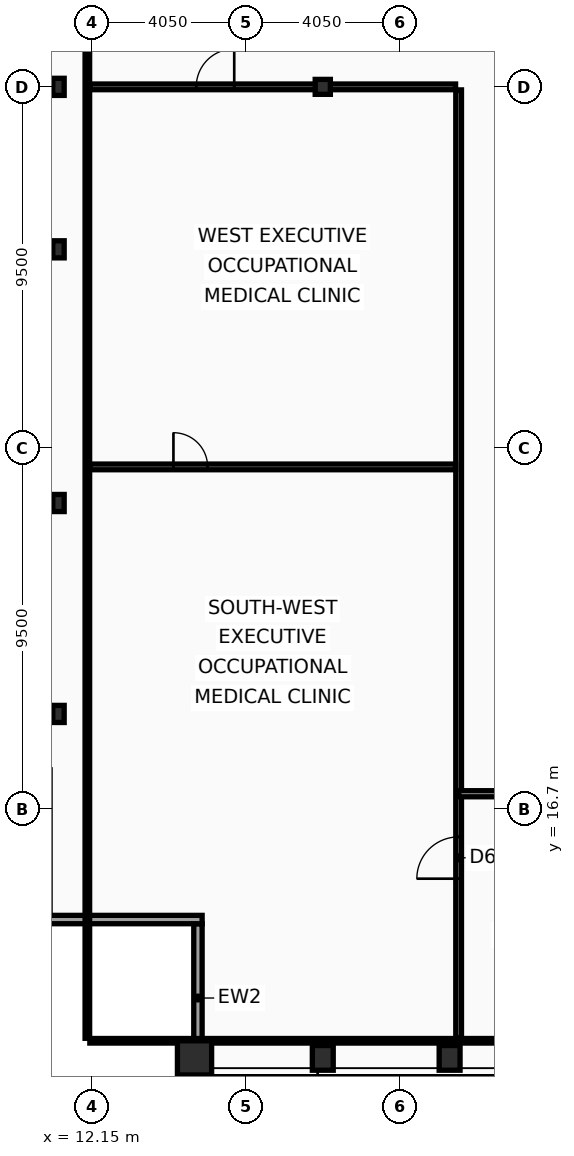
"""IFC4 building model, lengths in metres.
Left out: names, types, materials, properties, quantities, classifications, styles, units other than length and angle.
Written with IfcOpenShell. Run it as: python <this file> out.ifc"""

import sys

from ifc_helpers import new_model, si_unit, direction, frame, frame_2d, origin, origin_2d, place, context, subcontext, project, spatial, rectangle, hollow_rectangle, i_section, extrude, element, fill, save


model = new_model("IFC4")
c1 = context("Model", 3, precision=1e-05, world=origin(), true_north=direction((0.0, 1.0)))
c2 = subcontext(c1, "Body", "Model", "MODEL_VIEW")
j1 = project(units=[si_unit("LENGTHUNIT", "METRE"), si_unit("PLANEANGLEUNIT", "RADIAN")], contexts=[c1])
p1 = place(None, origin())
s1 = spatial("IfcSite", under=j1, at=p1, CompositionType="ELEMENT")
p2 = place(p1, origin())
s2 = spatial("IfcBuilding", under=s1, at=p2, CompositionType="ELEMENT")
p3 = place(p2, frame((0.0, 0.0, 318.2)))
s3 = spatial("IfcBuildingStorey", under=s2, at=p3, CompositionType="ELEMENT", Elevation=318.2)
p4 = place(p3, frame((14.85, 10.15, 0.0), z_axis=(0.0, 0.0, 1.0), x_axis=(1.0, 0.0, 0.0)))
e1 = element("IfcColumn", 1, at=p4, inside=s3, PredefinedType="COLUMN", context=c2, shape_type="SweptSolid", body=[
    extrude(hollow_rectangle(XDim=0.9, YDim=0.9, WallThickness=0.05, at=origin_2d()), origin(), (0.0, 0.0, 1.0), 3.6),
])
for number, where, z_axis, x_axis in (
    (2, (18.225, 10.15, 0.0), (0.0, 0.0, 1.0), (1.0, 0.0, 0.0)),
    (3, (21.562, 10.15, 0.0), (0.0, 0.0, 1.0), (1.0, 0.0, 0.0)),
):
    element("IfcColumn", number, at=place(p3, frame(where, z_axis=z_axis, x_axis=x_axis)), inside=s3, PredefinedType="COLUMN", context=c2, shape_type="SweptSolid", body=[
        extrude(hollow_rectangle(XDim=0.55, YDim=0.65, WallThickness=0.04, at=origin_2d()), origin(), (0.0, 0.0, 1.0), 3.6),
    ])
for number, where, z_axis, x_axis in (
    (4, (11.27, 19.2, 0.0), (0.0, 0.0, 1.0), (1.0, 0.0, 0.0)),
    (5, (11.27, 24.75, 0.0), (0.0, 0.0, 1.0), (1.0, 0.0, 0.0)),
    (6, (11.27, 31.425, 0.0), (0.0, 0.0, 1.0), (1.0, 0.0, 0.0)),
    (7, (11.27, 35.7, 0.0), (0.0, 0.0, 1.0), (1.0, 0.0, 0.0)),
):
    element("IfcColumn", number, at=place(p3, frame(where, z_axis=z_axis, x_axis=x_axis)), inside=s3, PredefinedType="COLUMN", context=c2, shape_type="SweptSolid", body=[
        extrude(i_section(OverallWidth=0.3, OverallDepth=0.45, WebThickness=0.014, FlangeThickness=0.026, at=origin_2d()), origin(), (0.0, 0.0, 1.0), 3.6),
    ])
p5 = place(p3, frame((18.225, 35.7, 0.0), z_axis=(0.0, 0.0, 1.0), x_axis=(1.0, 0.0, 0.0)))
e8 = element("IfcColumn", 8, at=p5, inside=s3, PredefinedType="COLUMN", context=c2, shape_type="SweptSolid", body=[
    extrude(i_section(OverallWidth=0.399, OverallDepth=0.393, WebThickness=0.023, FlangeThickness=0.037, at=origin_2d()), origin(), (0.0, 0.0, 1.0), 3.6),
])
p6 = place(p3, frame((14.94, 9.77, 0.0), z_axis=(0.0, 0.0, 1.0), x_axis=(0.0, 1.0, 0.0)))
e9 = element("IfcWall", 9, at=p6, inside=s3, PredefinedType="SOLIDWALL", context=c2, shape_type="SweptSolid", body=[
    extrude(rectangle(XDim=3.91, YDim=0.22, at=frame_2d((1.955, 0.0))), origin(), (0.0, 0.0, 1.0), 2.88),
])
p7 = place(p3, frame((15.05, 13.79, 0.0), z_axis=(0.0, 0.0, 1.0), x_axis=(-1.0, 0.0, 0.0)))
e10 = element("IfcWall", 10, at=p7, inside=s3, PredefinedType="SOLIDWALL", context=c2, shape_type="SweptSolid", body=[
    extrude(rectangle(XDim=4.22, YDim=0.22, at=frame_2d((2.11, 0.0))), origin(), (0.0, 0.0, 1.0), 2.88),
])
p8 = place(p3, frame((21.8, 10.665, 0.0), z_axis=(0.0, 0.0, 1.0), x_axis=(0.0, 1.0, 0.0)))
e11 = element("IfcWall", 11, at=p8, inside=s3, PredefinedType="PARTITIONING", context=c2, shape_type="SweptSolid", body=[
    extrude(rectangle(XDim=24.955, YDim=0.15, at=frame_2d((12.478, 0.0))), origin(), (0.0, 0.0, 1.0), 3.07),
])
p9 = place(p8, frame((4.2, 0.0, 0.0)))
e12 = element("IfcOpeningElement", 12, at=p9, cuts=e11, PredefinedType="OPENING", context=c2, shape_type="SweptSolid", body=[
    extrude(rectangle(XDim=1.1, YDim=2.1, at=frame_2d((0.55, 1.05))), frame((0.0, 0.085, 0.0), z_axis=(0.0, -1.0, 0.0), x_axis=(1.0, 0.0, 0.0)), (0.0, 0.0, 1.0), 0.17),
])
p10 = place(p3, frame((12.095, 35.7, 0.0), z_axis=(0.0, 0.0, 1.0), x_axis=(1.0, 0.0, 0.0)))
e13 = element("IfcWall", 13, at=p10, inside=s3, PredefinedType="PARTITIONING", context=c2, shape_type="SweptSolid", body=[
    extrude(rectangle(XDim=9.625, YDim=0.15, at=frame_2d((4.812, 0.0))), origin(), (0.0, 0.0, 1.0), 2.83),
])
p11 = place(p10, frame((2.8, 0.0, 0.0)))
e14 = element("IfcOpeningElement", 14, at=p11, cuts=e13, PredefinedType="OPENING", context=c2, shape_type="SweptSolid", body=[
    extrude(rectangle(XDim=1.0, YDim=2.05, at=frame_2d((0.5, 1.025))), frame((0.0, 0.085, 0.0), z_axis=(0.0, -1.0, 0.0), x_axis=(1.0, 0.0, 0.0)), (0.0, 0.0, 1.0), 0.17),
])
p12 = place(p3, frame((12.095, 25.7, 0.0), z_axis=(0.0, 0.0, 1.0), x_axis=(1.0, 0.0, 0.0)))
e15 = element("IfcWall", 15, at=p12, inside=s3, PredefinedType="PARTITIONING", context=c2, shape_type="SweptSolid", body=[
    extrude(rectangle(XDim=9.625, YDim=0.15, at=frame_2d((4.812, 0.0))), origin(), (0.0, 0.0, 1.0), 2.83),
])
p13 = place(p12, frame((2.2, 0.0, 0.0)))
e16 = element("IfcOpeningElement", 16, at=p13, cuts=e15, PredefinedType="OPENING", context=c2, shape_type="SweptSolid", body=[
    extrude(rectangle(XDim=0.9, YDim=2.05, at=frame_2d((0.45, 1.025))), frame((0.0, 0.085, 0.0), z_axis=(0.0, -1.0, 0.0), x_axis=(1.0, 0.0, 0.0)), (0.0, 0.0, 1.0), 0.17),
])
p14 = place(p3, frame((21.8, 17.1, 0.0), z_axis=(0.0, 0.0, 1.0), x_axis=(1.0, 0.0, 0.0)))
e17 = element("IfcWall", 17, at=p14, inside=s3, PredefinedType="PARTITIONING", context=c2, shape_type="SweptSolid", body=[
    extrude(rectangle(XDim=8.103, YDim=0.16, at=frame_2d((4.051, 0.0))), origin(), (0.0, 0.0, 1.0), 2.83),
])
p15 = place(p14, frame((3.653, 0.0, 0.0)))
e18 = element("IfcOpeningElement", 18, at=p15, cuts=e17, PredefinedType="OPENING", context=c2, shape_type="SweptSolid", body=[
    extrude(rectangle(XDim=1.0, YDim=2.05, at=frame_2d((0.5, 1.025))), frame((0.0, 0.09, 0.0), z_axis=(0.0, -1.0, 0.0), x_axis=(1.0, 0.0, 0.0)), (0.0, 0.0, 1.0), 0.18),
])
p16 = place(p3, frame((12.03, 10.665, 0.0), z_axis=(0.0, 0.0, 1.0), x_axis=(0.0, 1.0, 0.0)))
e19 = element("IfcWall", 19, at=p16, inside=s3, PredefinedType="PARTITIONING", context=c2, shape_type="SweptSolid", body=[
    extrude(rectangle(XDim=42.11, YDim=0.12, at=frame_2d((21.055, 0.0))), origin(), (0.0, 0.0, 1.0), 2.83),
])
p17 = place(p3, frame((12.095, 10.6, 0.0), z_axis=(0.0, 0.0, 1.0), x_axis=(1.0, 0.0, 0.0)))
e20 = element("IfcWall", 20, at=p17, inside=s3, PredefinedType="PARTITIONING", context=c2, shape_type="SweptSolid", body=[
    extrude(rectangle(XDim=48.71, YDim=0.12, at=frame_2d((24.355, 0.0))), origin(), (0.0, 0.0, 1.0), 2.83),
])
p18 = place(p9, origin())
e21 = element("IfcDoor", 21, at=p18, inside=s3, OperationType="SINGLE_SWING_LEFT", PredefinedType="DOOR", context=c2, shape_type="SweptSolid", body=[
    extrude(rectangle(XDim=1.1, YDim=2.1, at=frame_2d((0.55, 1.05))), frame((0.0, 0.025, 0.0), z_axis=(0.0, -1.0, 0.0), x_axis=(1.0, 0.0, 0.0)), (0.0, 0.0, 1.0), 0.05),
])
fill(e12, e21)
p19 = place(p11, origin())
e22 = element("IfcDoor", 22, at=p19, inside=s3, OperationType="SINGLE_SWING_RIGHT", PredefinedType="DOOR", context=c2, shape_type="SweptSolid", body=[
    extrude(rectangle(XDim=1.0, YDim=2.05, at=frame_2d((0.5, 1.025))), frame((0.0, 0.025, 0.0), z_axis=(0.0, -1.0, 0.0), x_axis=(1.0, 0.0, 0.0)), (0.0, 0.0, 1.0), 0.05),
])
fill(e14, e22)
p20 = place(p13, origin())
e23 = element("IfcDoor", 23, at=p20, inside=s3, OperationType="SINGLE_SWING_LEFT", PredefinedType="DOOR", context=c2, shape_type="SweptSolid", body=[
    extrude(rectangle(XDim=0.9, YDim=2.05, at=frame_2d((0.45, 1.025))), frame((0.0, 0.025, 0.0), z_axis=(0.0, -1.0, 0.0), x_axis=(1.0, 0.0, 0.0)), (0.0, 0.0, 1.0), 0.05),
])
fill(e16, e23)
save(model, sys.argv[1])
